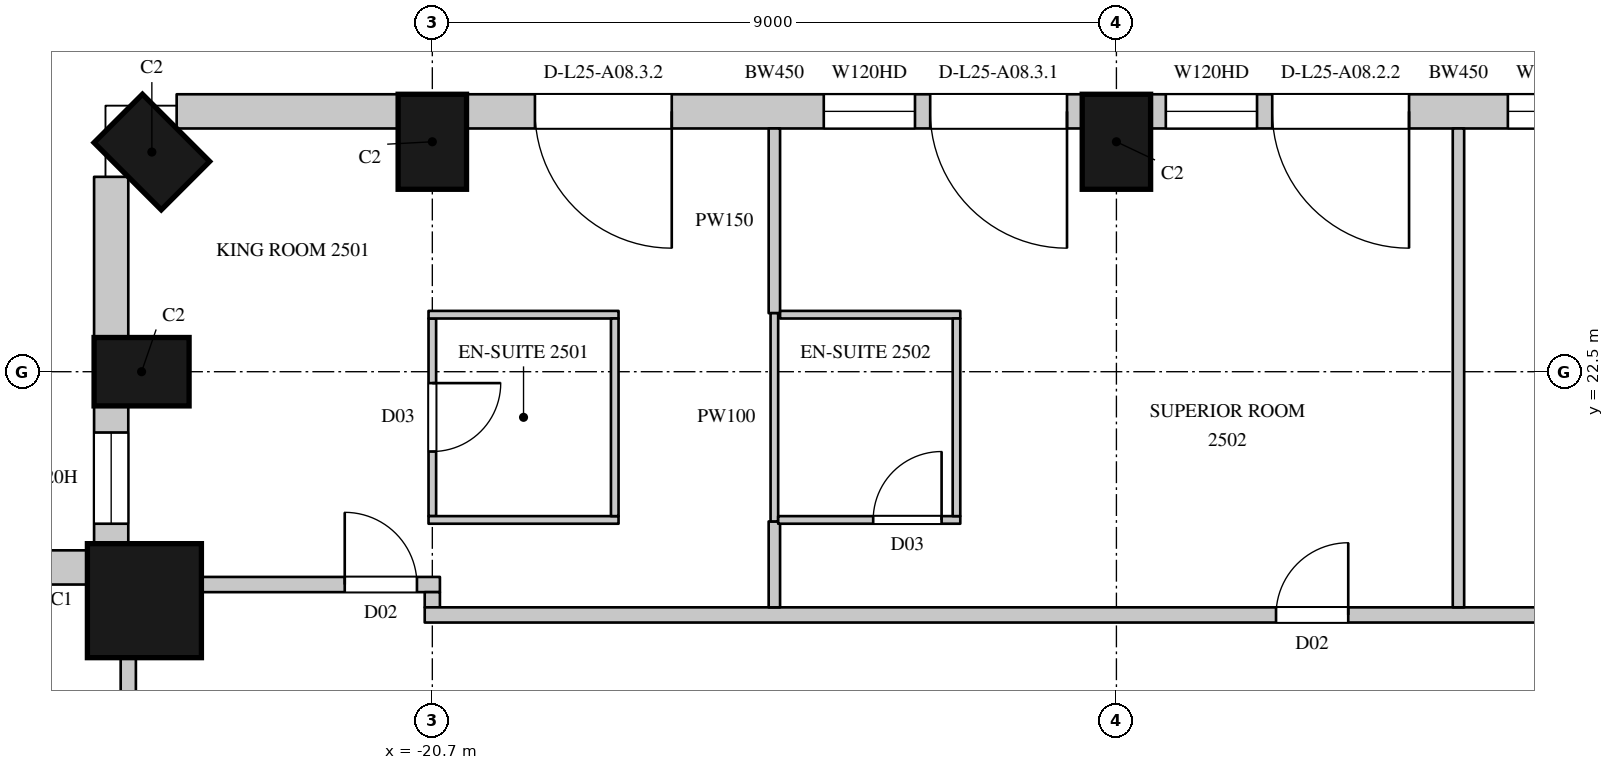
"""IFC4 building model, lengths in metres.
Left out: names, types, materials, properties, quantities, classifications, styles, units other than length and angle.
Written with IfcOpenShell. Run it as: python <this file> out.ifc"""

import sys

from ifc_helpers import new_model, si_unit, direction, frame, frame_2d, origin, origin_2d, place, context, subcontext, project, spatial, rectangle, circle, extrude, element, fill, save


model = new_model("IFC4")
c1 = context("Model", 3, precision=1e-05, world=origin(), true_north=direction((0.0, 1.0)))
c2 = subcontext(c1, "Body", "Model", "MODEL_VIEW")
j1 = project(units=[si_unit("LENGTHUNIT", "METRE"), si_unit("PLANEANGLEUNIT", "RADIAN")], contexts=[c1])
p1 = place(None, origin())
s1 = spatial("IfcSite", under=j1, at=p1, CompositionType="ELEMENT")
p2 = place(p1, origin())
s2 = spatial("IfcBuilding", under=s1, at=p2, CompositionType="ELEMENT")
p3 = place(p2, frame((0.0, 0.0, 120.3)))
s3 = spatial("IfcBuildingStorey", under=s2, at=p3, CompositionType="ELEMENT", Elevation=120.3)
for number, where, z_axis, x_axis in (
    (1, (-11.7, 25.525, 0.0), (0.0, 0.0, 1.0), (-1.0, 0.0, 0.0)),
    (2, (-20.7, 25.525, 0.0), (0.0, 0.0, 1.0), (-1.0, 0.0, 0.0)),
    (3, (-24.39, 25.39, 0.0), (0.0, 0.0, 1.0), (-0.707, -0.707, 0.0)),
    (4, (-24.525, 22.5, 0.0), (0.0, 0.0, 1.0), (0.0, -1.0, 0.0)),
):
    element("IfcColumn", number, at=place(p3, frame(where, z_axis=z_axis, x_axis=x_axis)), inside=s3, PredefinedType="COLUMN", context=c2, shape_type="SweptSolid", body=[
        extrude(rectangle(XDim=0.9, YDim=1.25, at=origin_2d()), origin(), (0.0, 0.0, 1.0), 3.6),
    ])
p4 = place(p3, frame((-24.488, 19.488, 0.0), z_axis=(0.0, 0.0, 1.0), x_axis=(1.0, 0.0, 0.0)))
e5 = element("IfcColumn", 5, at=p4, inside=s3, PredefinedType="COLUMN", context=c2, shape_type="SweptSolid", body=[
    extrude(circle(Radius=0.75, at=origin_2d()), origin(), (0.0, 0.0, 1.0), 3.6),
])
p5 = place(p3, frame((-3.15, 25.925, 0.0), z_axis=(0.0, 0.0, 1.0), x_axis=(-1.0, 0.0, 0.0)))
e6 = element("IfcWall", 6, at=p5, inside=s3, PredefinedType="SOLIDWALL", context=c2, shape_type="SweptSolid", body=[
    extrude(rectangle(XDim=8.1, YDim=0.45, at=frame_2d((4.05, 0.0))), origin(), (0.0, 0.0, 1.0), 3.3),
])
p6 = place(p5, frame((0.2, 0.0, 0.0)))
e7 = element("IfcOpeningElement", 7, at=p6, cuts=e6, PredefinedType="OPENING", context=c2, shape_type="SweptSolid", body=[
    extrude(rectangle(XDim=1.8, YDim=2.4, at=frame_2d((0.9, 1.2))), frame((0.0, 0.235, 0.0), z_axis=(0.0, -1.0, 0.0), x_axis=(1.0, 0.0, 0.0)), (0.0, 0.0, 1.0), 0.47),
])
p7 = place(p5, frame((2.2, 0.0, 1.05)))
e8 = element("IfcOpeningElement", 8, at=p7, cuts=e6, PredefinedType="OPENING", context=c2, shape_type="SweptSolid", body=[
    extrude(rectangle(XDim=1.2, YDim=2.0, at=frame_2d((0.6, 1.0))), frame((0.0, 0.235, 0.0), z_axis=(0.0, -1.0, 0.0), x_axis=(1.0, 0.0, 0.0)), (0.0, 0.0, 1.0), 0.47),
])
p8 = place(p5, frame((4.7, 0.0, 0.0)))
e9 = element("IfcOpeningElement", 9, at=p8, cuts=e6, PredefinedType="OPENING", context=c2, shape_type="SweptSolid", body=[
    extrude(rectangle(XDim=1.8, YDim=2.4, at=frame_2d((0.9, 1.2))), frame((0.0, 0.235, 0.0), z_axis=(0.0, -1.0, 0.0), x_axis=(1.0, 0.0, 0.0)), (0.0, 0.0, 1.0), 0.47),
])
p9 = place(p5, frame((6.7, 0.0, 1.05)))
e10 = element("IfcOpeningElement", 10, at=p9, cuts=e6, PredefinedType="OPENING", context=c2, shape_type="SweptSolid", body=[
    extrude(rectangle(XDim=1.2, YDim=2.0, at=frame_2d((0.6, 1.0))), frame((0.0, 0.235, 0.0), z_axis=(0.0, -1.0, 0.0), x_axis=(1.0, 0.0, 0.0)), (0.0, 0.0, 1.0), 0.47),
])
p10 = place(p3, frame((-12.15, 25.925, 0.0), z_axis=(0.0, 0.0, 1.0), x_axis=(-1.0, 0.0, 0.0)))
e11 = element("IfcWall", 11, at=p10, inside=s3, PredefinedType="SOLIDWALL", context=c2, shape_type="SweptSolid", body=[
    extrude(rectangle(XDim=8.1, YDim=0.45, at=frame_2d((4.05, 0.0))), origin(), (0.0, 0.0, 1.0), 3.3),
])
p11 = place(p10, frame((0.2, 0.0, 0.0)))
e12 = element("IfcOpeningElement", 12, at=p11, cuts=e11, PredefinedType="OPENING", context=c2, shape_type="SweptSolid", body=[
    extrude(rectangle(XDim=1.8, YDim=2.4, at=frame_2d((0.9, 1.2))), frame((0.0, 0.235, 0.0), z_axis=(0.0, -1.0, 0.0), x_axis=(1.0, 0.0, 0.0)), (0.0, 0.0, 1.0), 0.47),
])
p12 = place(p10, frame((2.2, 0.0, 1.05)))
e13 = element("IfcOpeningElement", 13, at=p12, cuts=e11, PredefinedType="OPENING", context=c2, shape_type="SweptSolid", body=[
    extrude(rectangle(XDim=1.2, YDim=2.0, at=frame_2d((0.6, 1.0))), frame((0.0, 0.235, 0.0), z_axis=(0.0, -1.0, 0.0), x_axis=(1.0, 0.0, 0.0)), (0.0, 0.0, 1.0), 0.47),
])
p13 = place(p10, frame((5.4, 0.0, 0.0)))
e14 = element("IfcOpeningElement", 14, at=p13, cuts=e11, PredefinedType="OPENING", context=c2, shape_type="SweptSolid", body=[
    extrude(rectangle(XDim=1.8, YDim=2.4, at=frame_2d((0.9, 1.2))), frame((0.0, 0.235, 0.0), z_axis=(0.0, -1.0, 0.0), x_axis=(1.0, 0.0, 0.0)), (0.0, 0.0, 1.0), 0.47),
])
p14 = place(p3, frame((-21.15, 25.925, 0.0), z_axis=(0.0, 0.0, 1.0), x_axis=(-1.0, 0.0, 0.0)))
e15 = element("IfcWall", 15, at=p14, inside=s3, PredefinedType="SOLIDWALL", context=c2, shape_type="SweptSolid", body=[
    extrude(rectangle(XDim=2.914, YDim=0.45, at=frame_2d((1.457, 0.0))), origin(), (0.0, 0.0, 1.0), 3.3),
])
p15 = place(p3, frame((-24.925, 25.064, 0.0), z_axis=(0.0, 0.0, 1.0), x_axis=(0.0, -1.0, 0.0)))
e16 = element("IfcWall", 16, at=p15, inside=s3, PredefinedType="SOLIDWALL", context=c2, shape_type="SweptSolid", body=[
    extrude(rectangle(XDim=2.114, YDim=0.45, at=frame_2d((1.057, 0.0))), origin(), (0.0, 0.0, 1.0), 3.3),
])
p16 = place(p3, frame((-24.925, 22.05, 0.0), z_axis=(0.0, 0.0, 1.0), x_axis=(0.0, -1.0, 0.0)))
e17 = element("IfcWall", 17, at=p16, inside=s3, PredefinedType="SOLIDWALL", context=c2, shape_type="SweptSolid", body=[
    extrude(rectangle(XDim=1.843, YDim=0.45, at=frame_2d((0.921, 0.0))), origin(), (0.0, 0.0, 1.0), 3.3),
])
p17 = place(p16, frame((0.35, 0.0, 1.05)))
e18 = element("IfcOpeningElement", 18, at=p17, cuts=e17, PredefinedType="OPENING", context=c2, shape_type="SweptSolid", body=[
    extrude(rectangle(XDim=1.2, YDim=2.0, at=frame_2d((0.6, 1.0))), frame((0.0, 0.235, 0.0), z_axis=(0.0, -1.0, 0.0), x_axis=(1.0, 0.0, 0.0)), (0.0, 0.0, 1.0), 0.47),
])
p18 = place(p3, frame((-25.207, 19.925, 0.0), z_axis=(0.0, 0.0, 1.0), x_axis=(-1.0, 0.0, 0.0)))
e19 = element("IfcWall", 19, at=p18, inside=s3, PredefinedType="SOLIDWALL", context=c2, shape_type="SweptSolid", body=[
    extrude(rectangle(XDim=3.857, YDim=0.45, at=frame_2d((1.928, 0.0))), origin(), (0.0, 0.0, 1.0), 3.3),
])
p19 = place(p18, frame((0.643, 0.0, 1.05)))
e20 = element("IfcOpeningElement", 20, at=p19, cuts=e19, PredefinedType="OPENING", context=c2, shape_type="SweptSolid", body=[
    extrude(rectangle(XDim=2.7, YDim=2.0, at=frame_2d((1.35, 1.0))), frame((0.0, 0.235, 0.0), z_axis=(0.0, -1.0, 0.0), x_axis=(1.0, 0.0, 0.0)), (0.0, 0.0, 1.0), 0.47),
])
p20 = place(p3, frame((-24.7, 16.03, 0.0), z_axis=(0.0, 0.0, 1.0), x_axis=(0.0, 1.0, 0.0)))
e21 = element("IfcWall", 21, at=p20, inside=s3, PredefinedType="PARTITIONING", context=c2, shape_type="SweptSolid", body=[
    extrude(rectangle(XDim=2.722, YDim=0.2, at=frame_2d((1.361, 0.0))), origin(), (0.0, 0.0, 1.0), 3.3),
])
p21 = place(p20, frame((0.45, 0.0, 0.0)))
e22 = element("IfcOpeningElement", 22, at=p21, cuts=e21, PredefinedType="OPENING", context=c2, shape_type="SweptSolid", body=[
    extrude(rectangle(XDim=1.6, YDim=2.4, at=frame_2d((0.8, 1.2))), frame((0.0, 0.11, 0.0), z_axis=(0.0, -1.0, 0.0), x_axis=(1.0, 0.0, 0.0)), (0.0, 0.0, 1.0), 0.22),
])
p22 = place(p3, frame((-23.752, 19.7, 0.0), z_axis=(0.0, 0.0, 1.0), x_axis=(1.0, 0.0, 0.0)))
e23 = element("IfcWall", 23, at=p22, inside=s3, PredefinedType="PARTITIONING", context=c2, shape_type="SweptSolid", body=[
    extrude(rectangle(XDim=3.152, YDim=0.2, at=frame_2d((1.576, 0.0))), origin(), (0.0, 0.0, 1.0), 3.3),
])
p23 = place(p22, frame((1.9, 0.0, 0.0)))
e24 = element("IfcOpeningElement", 24, at=p23, cuts=e23, PredefinedType="OPENING", context=c2, shape_type="SweptSolid", body=[
    extrude(rectangle(XDim=0.95, YDim=2.2, at=frame_2d((0.475, 1.1))), frame((0.0, 0.11, 0.0), z_axis=(0.0, -1.0, 0.0), x_axis=(1.0, 0.0, 0.0)), (0.0, 0.0, 1.0), 0.22),
])
p24 = place(p3, frame((-20.7, 19.4, 0.0), z_axis=(0.0, 0.0, 1.0), x_axis=(0.0, 1.0, 0.0)))
e25 = element("IfcWall", 25, at=p24, inside=s3, PredefinedType="PARTITIONING", context=c2, shape_type="SweptSolid", body=[
    extrude(rectangle(XDim=0.2, YDim=0.2, at=frame_2d((0.1, 0.0))), origin(), (0.0, 0.0, 1.0), 3.3),
])
p25 = place(p3, frame((-20.8, 19.3, 0.0), z_axis=(0.0, 0.0, 1.0), x_axis=(1.0, 0.0, 0.0)))
e26 = element("IfcWall", 26, at=p25, inside=s3, PredefinedType="PARTITIONING", context=c2, shape_type="SweptSolid", body=[
    extrude(rectangle(XDim=38.464, YDim=0.2, at=frame_2d((19.232, 0.0))), origin(), (0.0, 0.0, 1.0), 3.3),
])
p26 = place(p25, frame((24.05, 0.0, 0.0)))
e27 = element("IfcOpeningElement", 27, at=p26, cuts=e26, PredefinedType="OPENING", context=c2, shape_type="SweptSolid", body=[
    extrude(rectangle(XDim=0.9, YDim=2.2, at=frame_2d((0.45, 1.1))), frame((0.0, 0.11, 0.0), z_axis=(0.0, -1.0, 0.0), x_axis=(1.0, 0.0, 0.0)), (0.0, 0.0, 1.0), 0.22),
])
p27 = place(p25, frame((11.2, 0.0, 0.0)))
e28 = element("IfcOpeningElement", 28, at=p27, cuts=e26, PredefinedType="OPENING", context=c2, shape_type="SweptSolid", body=[
    extrude(rectangle(XDim=0.95, YDim=2.2, at=frame_2d((0.475, 1.1))), frame((0.0, 0.11, 0.0), z_axis=(0.0, -1.0, 0.0), x_axis=(1.0, 0.0, 0.0)), (0.0, 0.0, 1.0), 0.22),
])
p28 = place(p25, frame((15.05, 0.0, 0.0)))
e29 = element("IfcOpeningElement", 29, at=p28, cuts=e26, PredefinedType="OPENING", context=c2, shape_type="SweptSolid", body=[
    extrude(rectangle(XDim=0.95, YDim=2.2, at=frame_2d((0.475, 1.1))), frame((0.0, 0.11, 0.0), z_axis=(0.0, -1.0, 0.0), x_axis=(1.0, 0.0, 0.0)), (0.0, 0.0, 1.0), 0.22),
])
p29 = place(p25, frame((32.0, 0.0, 0.0)))
e30 = element("IfcOpeningElement", 30, at=p29, cuts=e26, PredefinedType="OPENING", context=c2, shape_type="SweptSolid", body=[
    extrude(rectangle(XDim=0.95, YDim=2.2, at=frame_2d((0.475, 1.1))), frame((0.0, 0.11, 0.0), z_axis=(0.0, -1.0, 0.0), x_axis=(1.0, 0.0, 0.0)), (0.0, 0.0, 1.0), 0.22),
])
p30 = place(p3, frame((-16.2, 19.4, 0.0), z_axis=(0.0, 0.0, 1.0), x_axis=(0.0, 1.0, 0.0)))
e31 = element("IfcWall", 31, at=p30, inside=s3, PredefinedType="PARTITIONING", context=c2, shape_type="SweptSolid", body=[
    extrude(rectangle(XDim=1.13, YDim=0.15, at=frame_2d((0.565, 0.0))), origin(), (0.0, 0.0, 1.0), 2.65),
])
p31 = place(p3, frame((-16.2, 23.27, 0.0), z_axis=(0.0, 0.0, 1.0), x_axis=(0.0, 1.0, 0.0)))
e32 = element("IfcWall", 32, at=p31, inside=s3, PredefinedType="PARTITIONING", context=c2, shape_type="SweptSolid", body=[
    extrude(rectangle(XDim=2.43, YDim=0.15, at=frame_2d((1.215, 0.0))), origin(), (0.0, 0.0, 1.0), 2.65),
])
p32 = place(p3, frame((-7.2, 19.4, 0.0), z_axis=(0.0, 0.0, 1.0), x_axis=(0.0, 1.0, 0.0)))
e33 = element("IfcWall", 33, at=p32, inside=s3, PredefinedType="PARTITIONING", context=c2, shape_type="SweptSolid", body=[
    extrude(rectangle(XDim=6.3, YDim=0.15, at=frame_2d((3.15, 0.0))), origin(), (0.0, 0.0, 1.0), 2.65),
])
p33 = place(p3, frame((-20.7, 20.6, 0.0), z_axis=(0.0, 0.0, 1.0), x_axis=(0.0, 1.0, 0.0)))
e34 = element("IfcWall", 34, at=p33, inside=s3, PredefinedType="PARTITIONING", context=c2, shape_type="SweptSolid", body=[
    extrude(rectangle(XDim=2.6, YDim=0.1, at=frame_2d((1.3, 0.0))), origin(), (0.0, 0.0, 1.0), 2.75),
])
p34 = place(p33, frame((0.85, 0.0, 0.0)))
e35 = element("IfcOpeningElement", 35, at=p34, cuts=e34, PredefinedType="OPENING", context=c2, shape_type="SweptSolid", body=[
    extrude(rectangle(XDim=0.9, YDim=2.2, at=frame_2d((0.45, 1.1))), frame((0.0, 0.06, 0.0), z_axis=(0.0, -1.0, 0.0), x_axis=(1.0, 0.0, 0.0)), (0.0, 0.0, 1.0), 0.12),
])
for number, where, z_axis, x_axis in (
    (36, (-20.75, 20.55, 0.0), (0.0, 0.0, 1.0), (1.0, 0.0, 0.0)),
    (37, (-20.75, 23.25, 0.0), (0.0, 0.0, 1.0), (1.0, 0.0, 0.0)),
):
    element("IfcWall", number, at=place(p3, frame(where, z_axis=z_axis, x_axis=x_axis)), inside=s3, PredefinedType="PARTITIONING", context=c2, shape_type="SweptSolid", body=[
        extrude(rectangle(XDim=2.5, YDim=0.1, at=frame_2d((1.25, 0.0))), origin(), (0.0, 0.0, 1.0), 3.3),
    ])
p35 = place(p3, frame((-18.3, 20.6, 0.0), z_axis=(0.0, 0.0, 1.0), x_axis=(0.0, 1.0, 0.0)))
e38 = element("IfcWall", 38, at=p35, inside=s3, PredefinedType="PARTITIONING", context=c2, shape_type="SweptSolid", body=[
    extrude(rectangle(XDim=2.6, YDim=0.1, at=frame_2d((1.3, 0.0))), origin(), (0.0, 0.0, 1.0), 3.3),
])
p36 = place(p3, frame((-16.2, 20.53, 0.0), z_axis=(0.0, 0.0, 1.0), x_axis=(0.0, 1.0, 0.0)))
e39 = element("IfcWall", 39, at=p36, inside=s3, PredefinedType="PARTITIONING", context=c2, shape_type="SweptSolid", body=[
    extrude(rectangle(XDim=2.74, YDim=0.1, at=frame_2d((1.37, 0.0))), origin(), (0.0, 0.0, 1.0), 2.65),
])
p37 = place(p3, frame((-16.15, 20.55, 0.0), z_axis=(0.0, 0.0, 1.0), x_axis=(1.0, 0.0, 0.0)))
e40 = element("IfcWall", 40, at=p37, inside=s3, PredefinedType="PARTITIONING", context=c2, shape_type="SweptSolid", body=[
    extrude(rectangle(XDim=2.396, YDim=0.1, at=frame_2d((1.198, 0.0))), origin(), (0.0, 0.0, 1.0), 3.3),
])
p38 = place(p37, frame((1.25, 0.0, 0.0)))
e41 = element("IfcOpeningElement", 41, at=p38, cuts=e40, PredefinedType="OPENING", context=c2, shape_type="SweptSolid", body=[
    extrude(rectangle(XDim=0.9, YDim=2.2, at=frame_2d((0.45, 1.1))), frame((0.0, 0.06, 0.0), z_axis=(0.0, -1.0, 0.0), x_axis=(1.0, 0.0, 0.0)), (0.0, 0.0, 1.0), 0.12),
])
p39 = place(p3, frame((-16.125, 23.25, 0.0), z_axis=(0.0, 0.0, 1.0), x_axis=(1.0, 0.0, 0.0)))
e42 = element("IfcWall", 42, at=p39, inside=s3, PredefinedType="PARTITIONING", context=c2, shape_type="SweptSolid", body=[
    extrude(rectangle(XDim=2.371, YDim=0.1, at=frame_2d((1.186, 0.0))), origin(), (0.0, 0.0, 1.0), 3.3),
])
p40 = place(p3, frame((-13.804, 20.6, 0.0), z_axis=(0.0, 0.0, 1.0), x_axis=(0.0, 1.0, 0.0)))
e43 = element("IfcWall", 43, at=p40, inside=s3, PredefinedType="PARTITIONING", context=c2, shape_type="SweptSolid", body=[
    extrude(rectangle(XDim=2.6, YDim=0.1, at=frame_2d((1.3, 0.0))), origin(), (0.0, 0.0, 1.0), 3.3),
])
p41 = place(p7, origin())
e44 = element("IfcWindow", 44, at=p41, inside=s3, PartitioningType="SINGLE_PANEL", PredefinedType="WINDOW", context=c2, shape_type="SweptSolid", body=[
    extrude(rectangle(XDim=1.2, YDim=2.0, at=frame_2d((0.6, 1.0))), frame((0.0, 0.135, 0.0), z_axis=(0.0, -1.0, 0.0), x_axis=(1.0, 0.0, 0.0)), (0.0, 0.0, 1.0), 0.06),
])
fill(e8, e44)
p42 = place(p8, origin())
e45 = element("IfcDoor", 45, at=p42, inside=s3, OperationType="SLIDING_TO_LEFT", PredefinedType="DOOR", context=c2, shape_type="SweptSolid", body=[
    extrude(rectangle(XDim=1.8, YDim=2.4, at=frame_2d((0.9, 1.2))), frame((0.0, 0.13, 0.0), z_axis=(0.0, -1.0, 0.0), x_axis=(1.0, 0.0, 0.0)), (0.0, 0.0, 1.0), 0.05),
])
fill(e9, e45)
p43 = place(p9, origin())
e46 = element("IfcWindow", 46, at=p43, inside=s3, PartitioningType="SINGLE_PANEL", PredefinedType="WINDOW", context=c2, shape_type="SweptSolid", body=[
    extrude(rectangle(XDim=1.2, YDim=2.0, at=frame_2d((0.6, 1.0))), frame((0.0, 0.135, 0.0), z_axis=(0.0, -1.0, 0.0), x_axis=(1.0, 0.0, 0.0)), (0.0, 0.0, 1.0), 0.06),
])
fill(e10, e46)
p44 = place(p11, origin())
e47 = element("IfcDoor", 47, at=p44, inside=s3, OperationType="SLIDING_TO_LEFT", PredefinedType="DOOR", context=c2, shape_type="SweptSolid", body=[
    extrude(rectangle(XDim=1.8, YDim=2.4, at=frame_2d((0.9, 1.2))), frame((0.0, 0.13, 0.0), z_axis=(0.0, -1.0, 0.0), x_axis=(1.0, 0.0, 0.0)), (0.0, 0.0, 1.0), 0.05),
])
fill(e12, e47)
p45 = place(p12, origin())
e48 = element("IfcWindow", 48, at=p45, inside=s3, PartitioningType="SINGLE_PANEL", PredefinedType="WINDOW", context=c2, shape_type="SweptSolid", body=[
    extrude(rectangle(XDim=1.2, YDim=2.0, at=frame_2d((0.6, 1.0))), frame((0.0, 0.135, 0.0), z_axis=(0.0, -1.0, 0.0), x_axis=(1.0, 0.0, 0.0)), (0.0, 0.0, 1.0), 0.06),
])
fill(e13, e48)
p46 = place(p13, origin())
e49 = element("IfcDoor", 49, at=p46, inside=s3, OperationType="SLIDING_TO_LEFT", PredefinedType="DOOR", context=c2, shape_type="SweptSolid", body=[
    extrude(rectangle(XDim=1.8, YDim=2.4, at=frame_2d((0.9, 1.2))), frame((0.0, 0.13, 0.0), z_axis=(0.0, -1.0, 0.0), x_axis=(1.0, 0.0, 0.0)), (0.0, 0.0, 1.0), 0.05),
])
fill(e14, e49)
p47 = place(p17, origin())
e50 = element("IfcWindow", 50, at=p47, inside=s3, PartitioningType="SINGLE_PANEL", PredefinedType="WINDOW", context=c2, shape_type="SweptSolid", body=[
    extrude(rectangle(XDim=1.2, YDim=2.0, at=frame_2d((0.6, 1.0))), frame((0.0, 0.135, 0.0), z_axis=(0.0, -1.0, 0.0), x_axis=(1.0, 0.0, 0.0)), (0.0, 0.0, 1.0), 0.06),
])
fill(e18, e50)
p48 = place(p23, origin())
e51 = element("IfcDoor", 51, at=p48, inside=s3, OperationType="SINGLE_SWING_LEFT", PredefinedType="DOOR", context=c2, shape_type="SweptSolid", body=[
    extrude(rectangle(XDim=0.95, YDim=2.2, at=frame_2d((0.475, 1.1))), frame((0.0, 0.025, 0.0), z_axis=(0.0, -1.0, 0.0), x_axis=(1.0, 0.0, 0.0)), (0.0, 0.0, 1.0), 0.05),
])
fill(e24, e51)
p49 = place(p34, origin())
e52 = element("IfcDoor", 52, at=p49, inside=s3, OperationType="SINGLE_SWING_LEFT", PredefinedType="DOOR", context=c2, shape_type="SweptSolid", body=[
    extrude(rectangle(XDim=0.9, YDim=2.2, at=frame_2d((0.45, 1.1))), frame((0.0, 0.025, 0.0), z_axis=(0.0, -1.0, 0.0), x_axis=(1.0, 0.0, 0.0)), (0.0, 0.0, 1.0), 0.05),
])
fill(e35, e52)
p50 = place(p27, origin())
e53 = element("IfcDoor", 53, at=p50, inside=s3, OperationType="SINGLE_SWING_RIGHT", PredefinedType="DOOR", context=c2, shape_type="SweptSolid", body=[
    extrude(rectangle(XDim=0.95, YDim=2.2, at=frame_2d((0.475, 1.1))), frame((0.0, 0.025, 0.0), z_axis=(0.0, -1.0, 0.0), x_axis=(1.0, 0.0, 0.0)), (0.0, 0.0, 1.0), 0.05),
])
fill(e28, e53)
p51 = place(p38, origin())
e54 = element("IfcDoor", 54, at=p51, inside=s3, OperationType="SINGLE_SWING_RIGHT", PredefinedType="DOOR", context=c2, shape_type="SweptSolid", body=[
    extrude(rectangle(XDim=0.9, YDim=2.2, at=frame_2d((0.45, 1.1))), frame((0.0, 0.025, 0.0), z_axis=(0.0, -1.0, 0.0), x_axis=(1.0, 0.0, 0.0)), (0.0, 0.0, 1.0), 0.05),
])
fill(e41, e54)
save(model, sys.argv[1])
